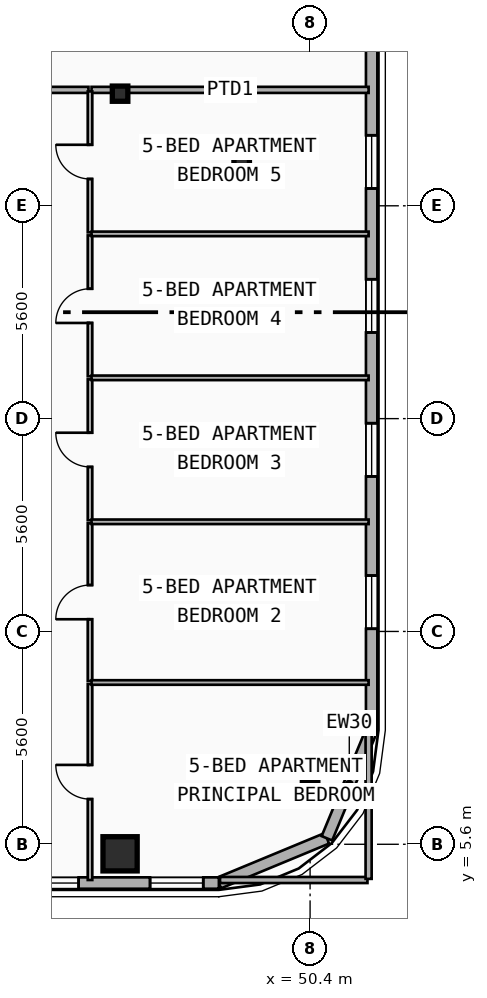
"""IFC4 building model, lengths in metres.
Left out: names, types, materials, properties, quantities, classifications, styles, units other than length and angle.
Written with IfcOpenShell. Run it as: python <this file> out.ifc"""

import sys

from ifc_helpers import new_model, si_unit, direction, frame, frame_2d, origin, origin_2d, place, context, subcontext, project, spatial, rectangle, i_section, extrude, element, fill, save


model = new_model("IFC4")
c1 = context("Model", 3, precision=1e-05, world=origin(), true_north=direction((0.0, 1.0)))
c2 = subcontext(c1, "Body", "Model", "MODEL_VIEW")
j1 = project(units=[si_unit("LENGTHUNIT", "METRE"), si_unit("PLANEANGLEUNIT", "RADIAN")], contexts=[c1])
p1 = place(None, origin())
s1 = spatial("IfcSite", under=j1, at=p1, CompositionType="ELEMENT")
p2 = place(p1, origin())
s2 = spatial("IfcBuilding", under=s1, at=p2, CompositionType="ELEMENT")
p3 = place(p2, frame((0.0, 0.0, 229.2)))
s3 = spatial("IfcBuildingStorey", under=s2, at=p3, CompositionType="ELEMENT", Elevation=229.2)
p4 = place(p3, frame((45.4, 25.35, 0.0), z_axis=(0.0, 0.0, 1.0), x_axis=(1.0, 0.0, 0.0)))
e1 = element("IfcColumn", 1, at=p4, inside=s3, PredefinedType="COLUMN", context=c2, shape_type="SweptSolid", body=[
    extrude(i_section(OverallWidth=0.408, OverallDepth=0.4, WebThickness=0.025, FlangeThickness=0.039, FilletRadius=0.015, at=origin_2d()), origin(), (0.0, 0.0, 1.0), 3.6),
])
p5 = place(p3, frame((45.4, 5.458, 0.0), z_axis=(0.0, -0.090298253426, 0.995914768154), x_axis=(1.0, 0.0, 0.0)))
e2 = element("IfcColumn", 2, at=p5, inside=s3, PredefinedType="COLUMN", context=c2, shape_type="SweptSolid", body=[
    extrude(rectangle(XDim=0.9, YDim=0.9, at=origin_2d()), origin(), (0.0, 0.0, 1.0), 3.615),
])
p6 = place(p3, frame((48.6, 23.6, 0.0), z_axis=(0.0, 0.0, 1.0), x_axis=(1.0, 0.0, 0.0)))
e3 = element("IfcColumn", 3, at=p6, inside=s3, PredefinedType="COLUMN", context=c2, shape_type="SweptSolid", body=[
    extrude(i_section(OverallWidth=0.408, OverallDepth=0.4, WebThickness=0.025, FlangeThickness=0.039, FilletRadius=0.015, at=origin_2d()), origin(), (0.0, 0.0, 1.0), 3.6),
])
p7 = place(p3, frame((50.4, 7.554, 0.0), z_axis=(0.0, -0.079901051777, 0.996802799918), x_axis=(1.0, 0.0, 0.0)))
e4 = element("IfcColumn", 4, at=p7, inside=s3, PredefinedType="COLUMN", context=c2, shape_type="SweptSolid", body=[
    extrude(i_section(OverallWidth=0.408, OverallDepth=0.4, WebThickness=0.025, FlangeThickness=0.039, FilletRadius=0.015, at=origin_2d()), origin(), (0.0, 0.0, 1.0), 3.612),
])
p8 = place(p3, frame((50.843, 5.757, 0.0), z_axis=(0.0, 0.0, 1.0), x_axis=(-0.92389884758, -0.382636798336, 0.0)))
e5 = element("IfcWall", 5, at=p8, inside=s3, PredefinedType="SOLIDWALL", context=c2, shape_type="SweptSolid", body=[
    extrude(rectangle(XDim=3.077, YDim=0.3, at=frame_2d((1.538, 0.0))), origin(), (0.0, 0.0, 1.0), 3.34),
])
p9 = place(p3, frame((52.02, 8.6, 0.0), z_axis=(0.0, 0.0, 1.0), x_axis=(-0.382676475685, -0.923882414032, 0.0)))
e6 = element("IfcWall", 6, at=p9, inside=s3, PredefinedType="SOLIDWALL", context=c2, shape_type="SweptSolid", body=[
    extrude(rectangle(XDim=3.077, YDim=0.3, at=frame_2d((1.539, 0.0))), origin(), (0.0, 0.0, 1.0), 3.34),
])
p10 = place(p3, frame((52.02, 37.2, 0.0), z_axis=(0.0, 0.0, 1.0), x_axis=(0.0, -1.0, 0.0)))
e7 = element("IfcWall", 7, at=p10, inside=s3, PredefinedType="SOLIDWALL", context=c2, shape_type="SweptSolid", body=[
    extrude(rectangle(XDim=28.6, YDim=0.3, at=frame_2d((14.3, 0.0))), origin(), (0.0, 0.0, 1.0), 3.34),
])
p11 = place(p10, frame((2.38, 0.0, 0.34)))
e8 = element("IfcOpeningElement", 8, at=p11, cuts=e7, PredefinedType="OPENING", context=c2, shape_type="SweptSolid", body=[
    extrude(rectangle(XDim=1.4, YDim=2.1, at=frame_2d((0.7, 1.05))), frame((0.0, 0.16, 0.0), z_axis=(0.0, -1.0, 0.0), x_axis=(1.0, 0.0, 0.0)), (0.0, 0.0, 1.0), 0.32),
])
p12 = place(p10, frame((5.84, 0.0, 0.34)))
e9 = element("IfcOpeningElement", 9, at=p12, cuts=e7, PredefinedType="OPENING", context=c2, shape_type="SweptSolid", body=[
    extrude(rectangle(XDim=1.4, YDim=2.1, at=frame_2d((0.7, 1.05))), frame((0.0, 0.16, 0.0), z_axis=(0.0, -1.0, 0.0), x_axis=(1.0, 0.0, 0.0)), (0.0, 0.0, 1.0), 0.32),
])
p13 = place(p10, frame((24.529, 0.0, 0.34)))
e10 = element("IfcOpeningElement", 10, at=p13, cuts=e7, PredefinedType="OPENING", context=c2, shape_type="SweptSolid", body=[
    extrude(rectangle(XDim=1.4, YDim=2.1, at=frame_2d((0.7, 1.05))), frame((0.0, 0.16, 0.0), z_axis=(0.0, -1.0, 0.0), x_axis=(1.0, 0.0, 0.0)), (0.0, 0.0, 1.0), 0.32),
])
p14 = place(p10, frame((20.521, 0.0, 0.34)))
e11 = element("IfcOpeningElement", 11, at=p14, cuts=e7, PredefinedType="OPENING", context=c2, shape_type="SweptSolid", body=[
    extrude(rectangle(XDim=1.4, YDim=2.1, at=frame_2d((0.7, 1.05))), frame((0.0, 0.16, 0.0), z_axis=(0.0, -1.0, 0.0), x_axis=(1.0, 0.0, 0.0)), (0.0, 0.0, 1.0), 0.32),
])
p15 = place(p10, frame((16.733, 0.0, 0.34)))
e12 = element("IfcOpeningElement", 12, at=p15, cuts=e7, PredefinedType="OPENING", context=c2, shape_type="SweptSolid", body=[
    extrude(rectangle(XDim=1.4, YDim=2.1, at=frame_2d((0.7, 1.05))), frame((0.0, 0.16, 0.0), z_axis=(0.0, -1.0, 0.0), x_axis=(1.0, 0.0, 0.0)), (0.0, 0.0, 1.0), 0.32),
])
p16 = place(p10, frame((12.945, 0.0, 0.34)))
e13 = element("IfcOpeningElement", 13, at=p16, cuts=e7, PredefinedType="OPENING", context=c2, shape_type="SweptSolid", body=[
    extrude(rectangle(XDim=1.4, YDim=2.1, at=frame_2d((0.7, 1.05))), frame((0.0, 0.16, 0.0), z_axis=(0.0, -1.0, 0.0), x_axis=(1.0, 0.0, 0.0)), (0.0, 0.0, 1.0), 0.32),
])
p17 = place(p3, frame((48.0, 4.58, 0.0), z_axis=(0.0, 0.0, 1.0), x_axis=(-1.0, 0.0, 0.0)))
e14 = element("IfcWall", 14, at=p17, inside=s3, PredefinedType="SOLIDWALL", context=c2, shape_type="SweptSolid", body=[
    extrude(rectangle(XDim=38.4, YDim=0.3, at=frame_2d((19.2, 0.0))), origin(), (0.0, 0.0, 1.0), 3.34),
])
p18 = place(p17, frame((33.902, 0.0, 1.05)))
e15 = element("IfcOpeningElement", 15, at=p18, cuts=e14, PredefinedType="OPENING", context=c2, shape_type="SweptSolid", body=[
    extrude(rectangle(XDim=1.2, YDim=1.5, at=frame_2d((0.6, 0.75))), frame((0.0, 0.16, 0.0), z_axis=(0.0, -1.0, 0.0), x_axis=(1.0, 0.0, 0.0)), (0.0, 0.0, 1.0), 0.32),
])
p19 = place(p17, frame((29.45, 0.0, 0.48)))
e16 = element("IfcOpeningElement", 16, at=p19, cuts=e14, PredefinedType="OPENING", context=c2, shape_type="SweptSolid", body=[
    extrude(rectangle(XDim=1.1, YDim=1.05, at=frame_2d((0.55, 0.525))), frame((0.0, 0.16, 0.0), z_axis=(0.0, -1.0, 0.0), x_axis=(1.0, 0.0, 0.0)), (0.0, 0.0, 1.0), 0.32),
])
p20 = place(p17, frame((36.589, 0.0, 0.75)))
e17 = element("IfcOpeningElement", 17, at=p20, cuts=e14, PredefinedType="OPENING", context=c2, shape_type="SweptSolid", body=[
    extrude(rectangle(XDim=1.4, YDim=1.8, at=frame_2d((0.7, 0.9))), frame((0.0, 0.16, 0.0), z_axis=(0.0, -1.0, 0.0), x_axis=(1.0, 0.0, 0.0)), (0.0, 0.0, 1.0), 0.32),
])
p21 = place(p17, frame((15.576, 0.0, 0.65)))
e18 = element("IfcOpeningElement", 18, at=p21, cuts=e14, PredefinedType="OPENING", context=c2, shape_type="SweptSolid", body=[
    extrude(rectangle(XDim=2.0, YDim=2.2, at=frame_2d((1.0, 1.1))), frame((0.0, 0.16, 0.0), z_axis=(0.0, -1.0, 0.0), x_axis=(1.0, 0.0, 0.0)), (0.0, 0.0, 1.0), 0.32),
])
p22 = place(p17, frame((22.776, 0.0, 0.65)))
e19 = element("IfcOpeningElement", 19, at=p22, cuts=e14, PredefinedType="OPENING", context=c2, shape_type="SweptSolid", body=[
    extrude(rectangle(XDim=2.0, YDim=2.2, at=frame_2d((1.0, 1.1))), frame((0.0, 0.16, 0.0), z_axis=(0.0, -1.0, 0.0), x_axis=(1.0, 0.0, 0.0)), (0.0, 0.0, 1.0), 0.32),
])
p23 = place(p17, frame((12.399, 0.0, 0.75)))
e20 = element("IfcOpeningElement", 20, at=p23, cuts=e14, PredefinedType="OPENING", context=c2, shape_type="SweptSolid", body=[
    extrude(rectangle(XDim=1.6, YDim=1.95, at=frame_2d((0.8, 0.975))), frame((0.0, 0.16, 0.0), z_axis=(0.0, -1.0, 0.0), x_axis=(1.0, 0.0, 0.0)), (0.0, 0.0, 1.0), 0.32),
])
p24 = place(p17, frame((3.691, 0.0, 0.48)))
e21 = element("IfcOpeningElement", 21, at=p24, cuts=e14, PredefinedType="OPENING", context=c2, shape_type="SweptSolid", body=[
    extrude(rectangle(XDim=1.2, YDim=1.5, at=frame_2d((0.6, 0.75))), frame((0.0, 0.16, 0.0), z_axis=(0.0, -1.0, 0.0), x_axis=(1.0, 0.0, 0.0)), (0.0, 0.0, 1.0), 0.32),
])
p25 = place(p17, frame((8.25, 0.0, 1.68)))
e22 = element("IfcOpeningElement", 22, at=p25, cuts=e14, PredefinedType="OPENING", context=c2, shape_type="SweptSolid", body=[
    extrude(rectangle(XDim=1.1, YDim=1.05, at=frame_2d((0.55, 0.525))), frame((0.0, 0.16, 0.0), z_axis=(0.0, -1.0, 0.0), x_axis=(1.0, 0.0, 0.0)), (0.0, 0.0, 1.0), 0.32),
])
p26 = place(p17, frame((0.411, 0.0, 0.75)))
e23 = element("IfcOpeningElement", 23, at=p26, cuts=e14, PredefinedType="OPENING", context=c2, shape_type="SweptSolid", body=[
    extrude(rectangle(XDim=1.4, YDim=1.8, at=frame_2d((0.7, 0.9))), frame((0.0, 0.16, 0.0), z_axis=(0.0, -1.0, 0.0), x_axis=(1.0, 0.0, 0.0)), (0.0, 0.0, 1.0), 0.32),
])
p27 = place(p3, frame((41.09, 25.45, 0.0), z_axis=(0.0, 0.0, 1.0), x_axis=(1.0, 0.0, 0.0)))
e24 = element("IfcWall", 24, at=p27, inside=s3, PredefinedType="PARTITIONING", context=c2, shape_type="SweptSolid", body=[
    extrude(rectangle(XDim=3.479, YDim=0.16, at=frame_2d((1.74, 0.0))), origin(), (0.0, 0.0, 1.0), 3.34),
])
p28 = place(p27, frame((1.24, 0.0, 0.0)))
e25 = element("IfcOpeningElement", 25, at=p28, cuts=e24, PredefinedType="OPENING", context=c2, shape_type="SweptSolid", body=[
    extrude(rectangle(XDim=1.0, YDim=2.15, at=frame_2d((0.5, 1.075))), frame((0.0, 0.09, 0.0), z_axis=(0.0, -1.0, 0.0), x_axis=(1.0, 0.0, 0.0)), (0.0, 0.0, 1.0), 0.18),
])
p29 = place(p3, frame((44.649, 25.45, 0.0), z_axis=(0.0, 0.0, 1.0), x_axis=(1.0, 0.0, 0.0)))
e26 = element("IfcWall", 26, at=p29, inside=s3, PredefinedType="PARTITIONING", context=c2, shape_type="SweptSolid", body=[
    extrude(rectangle(XDim=7.291, YDim=0.16, at=frame_2d((3.646, 0.0))), origin(), (0.0, 0.0, 1.0), 2.52),
])
p30 = place(p3, frame((44.609, 4.66, 0.0), z_axis=(0.0, 0.0, 1.0), x_axis=(0.0, 1.0, 0.0)))
e27 = element("IfcWall", 27, at=p30, inside=s3, PredefinedType="PARTITIONING", context=c2, shape_type="SweptSolid", body=[
    extrude(rectangle(XDim=5.157, YDim=0.12, at=frame_2d((2.579, 0.0))), origin(), (0.0, 0.0, 1.0), 2.92),
])
p31 = place(p30, frame((2.128, 0.0, 0.0)))
e28 = element("IfcOpeningElement", 28, at=p31, cuts=e27, PredefinedType="OPENING", context=c2, shape_type="SweptSolid", body=[
    extrude(rectangle(XDim=0.9, YDim=2.1, at=frame_2d((0.45, 1.05))), frame((0.0, 0.07, 0.0), z_axis=(0.0, -1.0, 0.0), x_axis=(1.0, 0.0, 0.0)), (0.0, 0.0, 1.0), 0.14),
])
p32 = place(p3, frame((44.609, 9.897, 0.0), z_axis=(0.0, 0.0, 1.0), x_axis=(0.0, 1.0, 0.0)))
e29 = element("IfcWall", 29, at=p32, inside=s3, PredefinedType="PARTITIONING", context=c2, shape_type="SweptSolid", body=[
    extrude(rectangle(XDim=4.148, YDim=0.12, at=frame_2d((2.074, 0.0))), origin(), (0.0, 0.0, 1.0), 2.93),
])
p33 = place(p32, frame((1.624, 0.0, 0.0)))
e30 = element("IfcOpeningElement", 30, at=p33, cuts=e29, PredefinedType="OPENING", context=c2, shape_type="SweptSolid", body=[
    extrude(rectangle(XDim=0.9, YDim=2.1, at=frame_2d((0.45, 1.05))), frame((0.0, 0.07, 0.0), z_axis=(0.0, -1.0, 0.0), x_axis=(1.0, 0.0, 0.0)), (0.0, 0.0, 1.0), 0.14),
])
p34 = place(p3, frame((44.609, 14.125, 0.0), z_axis=(0.0, 0.0, 1.0), x_axis=(0.0, 1.0, 0.0)))
e31 = element("IfcWall", 31, at=p34, inside=s3, PredefinedType="PARTITIONING", context=c2, shape_type="SweptSolid", body=[
    extrude(rectangle(XDim=3.708, YDim=0.12, at=frame_2d((1.854, 0.0))), origin(), (0.0, 0.0, 1.0), 2.92),
])
p35 = place(p34, frame((1.404, 0.0, 0.0)))
e32 = element("IfcOpeningElement", 32, at=p35, cuts=e31, PredefinedType="OPENING", context=c2, shape_type="SweptSolid", body=[
    extrude(rectangle(XDim=0.9, YDim=2.1, at=frame_2d((0.45, 1.05))), frame((0.0, 0.07, 0.0), z_axis=(0.0, -1.0, 0.0), x_axis=(1.0, 0.0, 0.0)), (0.0, 0.0, 1.0), 0.14),
])
p36 = place(p3, frame((44.609, 17.913, 0.0), z_axis=(0.0, 0.0, 1.0), x_axis=(0.0, 1.0, 0.0)))
e33 = element("IfcWall", 33, at=p36, inside=s3, PredefinedType="PARTITIONING", context=c2, shape_type="SweptSolid", body=[
    extrude(rectangle(XDim=3.708, YDim=0.12, at=frame_2d((1.854, 0.0))), origin(), (0.0, 0.0, 1.0), 2.93),
])
p37 = place(p36, frame((1.404, 0.0, 0.0)))
e34 = element("IfcOpeningElement", 34, at=p37, cuts=e33, PredefinedType="OPENING", context=c2, shape_type="SweptSolid", body=[
    extrude(rectangle(XDim=0.9, YDim=2.1, at=frame_2d((0.45, 1.05))), frame((0.0, 0.07, 0.0), z_axis=(0.0, -1.0, 0.0), x_axis=(1.0, 0.0, 0.0)), (0.0, 0.0, 1.0), 0.14),
])
p38 = place(p3, frame((44.609, 21.701, 0.0), z_axis=(0.0, 0.0, 1.0), x_axis=(0.0, 1.0, 0.0)))
e35 = element("IfcWall", 35, at=p38, inside=s3, PredefinedType="PARTITIONING", context=c2, shape_type="SweptSolid", body=[
    extrude(rectangle(XDim=3.709, YDim=0.12, at=frame_2d((1.854, 0.0))), origin(), (0.0, 0.0, 1.0), 2.92),
])
p39 = place(p38, frame((1.405, 0.0, 0.0)))
e36 = element("IfcOpeningElement", 36, at=p39, cuts=e35, PredefinedType="OPENING", context=c2, shape_type="SweptSolid", body=[
    extrude(rectangle(XDim=0.9, YDim=2.1, at=frame_2d((0.45, 1.05))), frame((0.0, 0.07, 0.0), z_axis=(0.0, -1.0, 0.0), x_axis=(1.0, 0.0, 0.0)), (0.0, 0.0, 1.0), 0.14),
])
for number, where, z_axis, x_axis in (
    (37, (44.649, 9.857, 0.0), (0.0, 0.0, 1.0), (1.0, 0.0, 0.0)),
    (38, (44.649, 14.085, 0.0), (0.0, 0.0, 1.0), (1.0, 0.0, 0.0)),
    (39, (44.649, 17.873, 0.0), (0.0, 0.0, 1.0), (1.0, 0.0, 0.0)),
    (40, (44.649, 21.661, 0.0), (0.0, 0.0, 1.0), (1.0, 0.0, 0.0)),
):
    element("IfcWall", number, at=place(p3, frame(where, z_axis=z_axis, x_axis=x_axis)), inside=s3, PredefinedType="PARTITIONING", context=c2, shape_type="SweptSolid", body=[
        extrude(rectangle(XDim=7.291, YDim=0.12, at=frame_2d((3.646, 0.0))), origin(), (0.0, 0.0, 1.0), 2.52),
    ])
p40 = place(p3, frame((48.03, 4.66, 0.0), z_axis=(0.0, 0.0, 1.0), x_axis=(1.0, 0.0, 0.0)))
e41 = element("IfcWall", 41, at=p40, inside=s3, PredefinedType="PARTITIONING", context=c2, shape_type="SweptSolid", body=[
    extrude(rectangle(XDim=3.88, YDim=0.16, at=frame_2d((1.94, 0.0))), origin(), (0.0, 0.0, 1.0), 3.34),
])
p41 = place(p3, frame((51.94, 4.69, 0.0), z_axis=(0.0, 0.0, 1.0), x_axis=(0.0, 1.0, 0.0)))
e42 = element("IfcWall", 42, at=p41, inside=s3, PredefinedType="PARTITIONING", context=c2, shape_type="SweptSolid", body=[
    extrude(rectangle(XDim=3.88, YDim=0.16, at=frame_2d((1.94, 0.0))), origin(), (0.0, 0.0, 1.0), 3.34),
])
p42 = place(p13, origin())
e43 = element("IfcWindow", 43, at=p42, inside=s3, PartitioningType="SINGLE_PANEL", PredefinedType="WINDOW", context=c2, shape_type="SweptSolid", body=[
    extrude(rectangle(XDim=1.4, YDim=2.1, at=frame_2d((0.7, 1.05))), frame((0.0, 0.03, 0.0), z_axis=(0.0, -1.0, 0.0), x_axis=(1.0, 0.0, 0.0)), (0.0, 0.0, 1.0), 0.06),
])
fill(e10, e43)
p43 = place(p14, origin())
e44 = element("IfcWindow", 44, at=p43, inside=s3, PartitioningType="SINGLE_PANEL", PredefinedType="WINDOW", context=c2, shape_type="SweptSolid", body=[
    extrude(rectangle(XDim=1.4, YDim=2.1, at=frame_2d((0.7, 1.05))), frame((0.0, 0.03, 0.0), z_axis=(0.0, -1.0, 0.0), x_axis=(1.0, 0.0, 0.0)), (0.0, 0.0, 1.0), 0.06),
])
fill(e11, e44)
p44 = place(p15, origin())
e45 = element("IfcWindow", 45, at=p44, inside=s3, PartitioningType="SINGLE_PANEL", PredefinedType="WINDOW", context=c2, shape_type="SweptSolid", body=[
    extrude(rectangle(XDim=1.4, YDim=2.1, at=frame_2d((0.7, 1.05))), frame((0.0, 0.03, 0.0), z_axis=(0.0, -1.0, 0.0), x_axis=(1.0, 0.0, 0.0)), (0.0, 0.0, 1.0), 0.06),
])
fill(e12, e45)
p45 = place(p16, origin())
e46 = element("IfcWindow", 46, at=p45, inside=s3, PartitioningType="SINGLE_PANEL", PredefinedType="WINDOW", context=c2, shape_type="SweptSolid", body=[
    extrude(rectangle(XDim=1.4, YDim=2.1, at=frame_2d((0.7, 1.05))), frame((0.0, 0.03, 0.0), z_axis=(0.0, -1.0, 0.0), x_axis=(1.0, 0.0, 0.0)), (0.0, 0.0, 1.0), 0.06),
])
fill(e13, e46)
p46 = place(p24, origin())
e47 = element("IfcWindow", 47, at=p46, inside=s3, PartitioningType="SINGLE_PANEL", PredefinedType="WINDOW", context=c2, shape_type="SweptSolid", body=[
    extrude(rectangle(XDim=1.2, YDim=1.5, at=frame_2d((0.6, 0.75))), frame((0.0, 0.03, 0.0), z_axis=(0.0, -1.0, 0.0), x_axis=(1.0, 0.0, 0.0)), (0.0, 0.0, 1.0), 0.06),
])
fill(e21, e47)
p47 = place(p26, origin())
e48 = element("IfcWindow", 48, at=p47, inside=s3, PartitioningType="SINGLE_PANEL", PredefinedType="WINDOW", context=c2, shape_type="SweptSolid", body=[
    extrude(rectangle(XDim=1.4, YDim=1.8, at=frame_2d((0.7, 0.9))), frame((0.0, 0.03, 0.0), z_axis=(0.0, -1.0, 0.0), x_axis=(1.0, 0.0, 0.0)), (0.0, 0.0, 1.0), 0.06),
])
fill(e23, e48)
p48 = place(p31, origin())
e49 = element("IfcDoor", 49, at=p48, inside=s3, OperationType="SINGLE_SWING_RIGHT", PredefinedType="DOOR", context=c2, shape_type="SweptSolid", body=[
    extrude(rectangle(XDim=0.9, YDim=2.1, at=frame_2d((0.45, 1.05))), frame((0.0, 0.025, 0.0), z_axis=(0.0, -1.0, 0.0), x_axis=(1.0, 0.0, 0.0)), (0.0, 0.0, 1.0), 0.05),
])
fill(e28, e49)
p49 = place(p33, origin())
e50 = element("IfcDoor", 50, at=p49, inside=s3, OperationType="SINGLE_SWING_LEFT", PredefinedType="DOOR", context=c2, shape_type="SweptSolid", body=[
    extrude(rectangle(XDim=0.9, YDim=2.1, at=frame_2d((0.45, 1.05))), frame((0.0, 0.025, 0.0), z_axis=(0.0, -1.0, 0.0), x_axis=(1.0, 0.0, 0.0)), (0.0, 0.0, 1.0), 0.05),
])
fill(e30, e50)
p50 = place(p35, origin())
e51 = element("IfcDoor", 51, at=p50, inside=s3, OperationType="SINGLE_SWING_RIGHT", PredefinedType="DOOR", context=c2, shape_type="SweptSolid", body=[
    extrude(rectangle(XDim=0.9, YDim=2.1, at=frame_2d((0.45, 1.05))), frame((0.0, 0.025, 0.0), z_axis=(0.0, -1.0, 0.0), x_axis=(1.0, 0.0, 0.0)), (0.0, 0.0, 1.0), 0.05),
])
fill(e32, e51)
p51 = place(p37, origin())
e52 = element("IfcDoor", 52, at=p51, inside=s3, OperationType="SINGLE_SWING_LEFT", PredefinedType="DOOR", context=c2, shape_type="SweptSolid", body=[
    extrude(rectangle(XDim=0.9, YDim=2.1, at=frame_2d((0.45, 1.05))), frame((0.0, 0.025, 0.0), z_axis=(0.0, -1.0, 0.0), x_axis=(1.0, 0.0, 0.0)), (0.0, 0.0, 1.0), 0.05),
])
fill(e34, e52)
p52 = place(p39, origin())
e53 = element("IfcDoor", 53, at=p52, inside=s3, OperationType="SINGLE_SWING_RIGHT", PredefinedType="DOOR", context=c2, shape_type="SweptSolid", body=[
    extrude(rectangle(XDim=0.9, YDim=2.1, at=frame_2d((0.45, 1.05))), frame((0.0, 0.025, 0.0), z_axis=(0.0, -1.0, 0.0), x_axis=(1.0, 0.0, 0.0)), (0.0, 0.0, 1.0), 0.05),
])
fill(e36, e53)
save(model, sys.argv[1])
